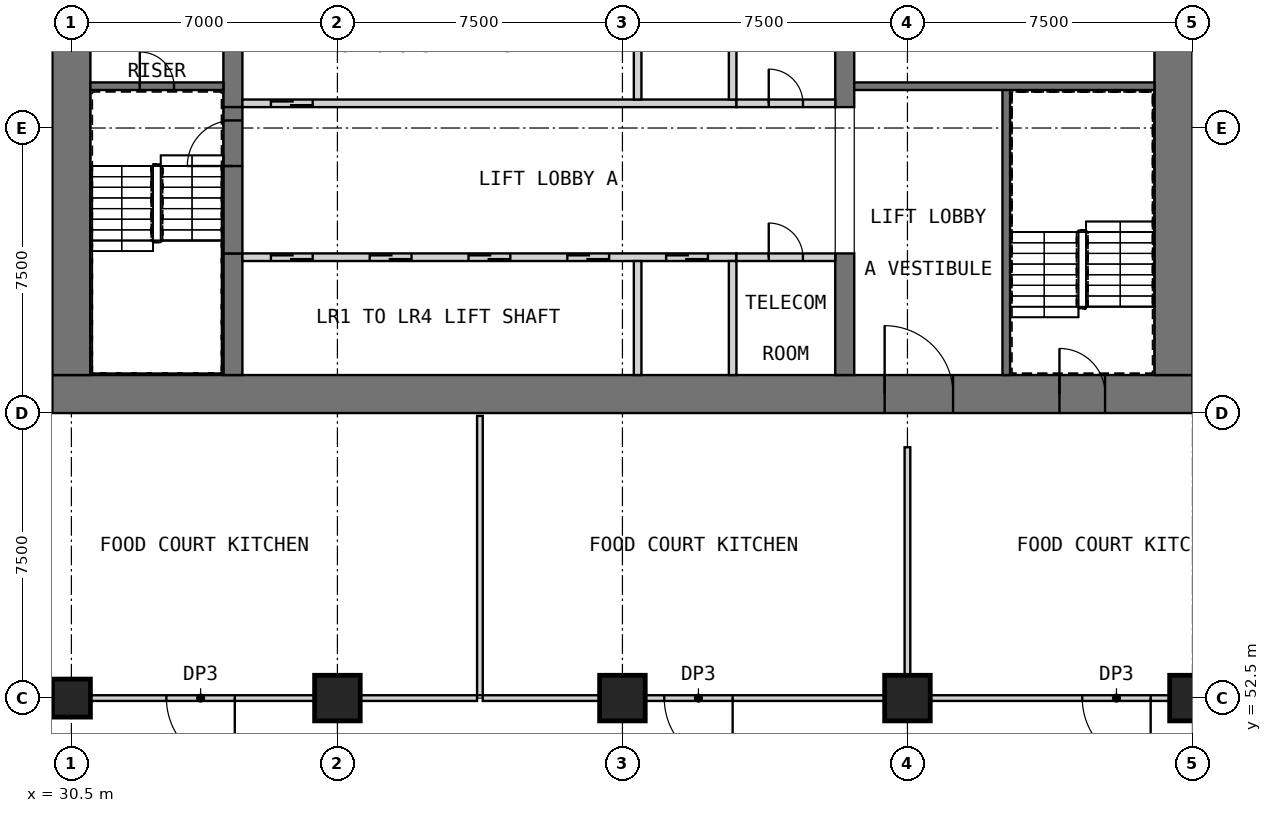
"""IFC4 building model, lengths in metres.
Left out: names, types, materials, properties, quantities, classifications, styles, units other than length and angle.
Written with IfcOpenShell. Run it as: python <this file> out.ifc"""

import sys

from ifc_helpers import new_model, si_unit, direction, frame, frame_2d, origin, origin_2d, place, context, subcontext, project, spatial, rectangle, extrude, element, fill, save


model = new_model("IFC4")
c1 = context("Model", 3, precision=1e-05, world=origin(), true_north=direction((0.0, 1.0)))
c2 = subcontext(c1, "Body", "Model", "MODEL_VIEW")
j1 = project(units=[si_unit("LENGTHUNIT", "METRE"), si_unit("PLANEANGLEUNIT", "RADIAN")], contexts=[c1])
p1 = place(None, origin())
s1 = spatial("IfcSite", under=j1, at=p1, CompositionType="ELEMENT")
p2 = place(p1, origin())
s2 = spatial("IfcBuilding", under=s1, at=p2, CompositionType="ELEMENT")
p3 = place(p2, frame((0.0, 0.0, 18.5)))
s3 = spatial("IfcBuildingStorey", under=s2, at=p3, CompositionType="ELEMENT", Elevation=18.5)
p4 = place(p3, frame((30.5, 52.5, 0.0), z_axis=(0.0, 0.0, 1.0), x_axis=(1.0, 0.0, 0.0)))
e1 = element("IfcColumn", 1, at=p4, inside=s3, PredefinedType="COLUMN", context=c2, shape_type="SweptSolid", body=[
    extrude(rectangle(XDim=1.0, YDim=1.0, at=origin_2d()), origin(), (0.0, 0.0, 1.0), 5.0),
])
for number, where, z_axis, x_axis in (
    (2, (37.5, 52.5, 0.0), (0.0, 0.0, 1.0), (1.0, 0.0, 0.0)),
    (3, (45.0, 52.5, 0.0), (0.0, 0.0, 1.0), (1.0, 0.0, 0.0)),
    (4, (52.5, 52.5, 0.0), (0.0, 0.0, 1.0), (1.0, 0.0, 0.0)),
    (5, (60.0, 52.5, 0.0), (0.0, 0.0, 1.0), (1.0, 0.0, 0.0)),
):
    element("IfcColumn", number, at=place(p3, frame(where, z_axis=z_axis, x_axis=x_axis)), inside=s3, PredefinedType="COLUMN", context=c2, shape_type="SweptSolid", body=[
        extrude(rectangle(XDim=1.2, YDim=1.2, at=origin_2d()), origin(), (0.0, 0.0, 1.0), 5.0),
    ])
p5 = place(p3, frame((30.0, 60.5, 0.0), z_axis=(0.0, 0.0, 1.0), x_axis=(1.0, 0.0, 0.0)))
e6 = element("IfcWall", 6, at=p5, inside=s3, PredefinedType="SHEAR", context=c2, shape_type="SweptSolid", body=[
    extrude(rectangle(XDim=30.0, YDim=1.0, at=frame_2d((15.0, 0.0))), origin(), (0.0, 0.0, 1.0), 5.0),
])
p6 = place(p5, frame((21.9, 0.0, 0.0)))
e7 = element("IfcOpeningElement", 7, at=p6, cuts=e6, PredefinedType="OPENING", context=c2, shape_type="SweptSolid", body=[
    extrude(rectangle(XDim=1.8, YDim=2.1, at=frame_2d((0.9, 1.05))), frame((0.0, 0.51, 0.0), z_axis=(0.0, -1.0, 0.0), x_axis=(1.0, 0.0, 0.0)), (0.0, 0.0, 1.0), 1.02),
])
p7 = place(p5, frame((26.5, 0.0, 0.0)))
e8 = element("IfcOpeningElement", 8, at=p7, cuts=e6, PredefinedType="OPENING", context=c2, shape_type="SweptSolid", body=[
    extrude(rectangle(XDim=1.2, YDim=2.1, at=frame_2d((0.6, 1.05))), frame((0.0, 0.51, 0.0), z_axis=(0.0, -1.0, 0.0), x_axis=(1.0, 0.0, 0.0)), (0.0, 0.0, 1.0), 1.02),
])
p8 = place(p3, frame((30.5, 61.0, 0.0), z_axis=(0.0, 0.0, 1.0), x_axis=(0.0, 1.0, 0.0)))
e9 = element("IfcWall", 9, at=p8, inside=s3, PredefinedType="SHEAR", context=c2, shape_type="SweptSolid", body=[
    extrude(rectangle(XDim=20.5, YDim=1.0, at=frame_2d((10.25, 0.0))), origin(), (0.0, 0.0, 1.0), 5.0),
])
p9 = place(p3, frame((59.5, 61.0, 0.0), z_axis=(0.0, 0.0, 1.0), x_axis=(0.0, 1.0, 0.0)))
e10 = element("IfcWall", 10, at=p9, inside=s3, PredefinedType="SHEAR", context=c2, shape_type="SweptSolid", body=[
    extrude(rectangle(XDim=20.5, YDim=1.0, at=frame_2d((10.25, 0.0))), origin(), (0.0, 0.0, 1.0), 5.0),
])
p10 = place(p9, frame((14.5, 0.0, 0.0)))
e11 = element("IfcOpeningElement", 11, at=p10, cuts=e10, PredefinedType="OPENING", context=c2, shape_type="SweptSolid", body=[
    extrude(rectangle(XDim=1.8, YDim=2.1, at=frame_2d((0.9, 1.05))), frame((0.0, 0.51, 0.0), z_axis=(0.0, -1.0, 0.0), x_axis=(1.0, 0.0, 0.0)), (0.0, 0.0, 1.0), 1.02),
])
p11 = place(p3, frame((34.75, 61.0, 0.0), z_axis=(0.0, 0.0, 1.0), x_axis=(0.0, 1.0, 0.0)))
e12 = element("IfcWall", 12, at=p11, inside=s3, PredefinedType="SHEAR", context=c2, shape_type="SweptSolid", body=[
    extrude(rectangle(XDim=3.2, YDim=0.5, at=frame_2d((1.6, 0.0))), origin(), (0.0, 0.0, 1.0), 5.0),
])
p12 = place(p3, frame((34.75, 68.05, 0.0), z_axis=(0.0, 0.0, 1.0), x_axis=(0.0, 1.0, 0.0)))
e13 = element("IfcWall", 13, at=p12, inside=s3, PredefinedType="SHEAR", context=c2, shape_type="SweptSolid", body=[
    extrude(rectangle(XDim=6.4, YDim=0.5, at=frame_2d((3.2, 0.0))), origin(), (0.0, 0.0, 1.0), 5.0),
])
p13 = place(p3, frame((50.85, 61.0, 0.0), z_axis=(0.0, 0.0, 1.0), x_axis=(0.0, 1.0, 0.0)))
e14 = element("IfcWall", 14, at=p13, inside=s3, PredefinedType="SHEAR", context=c2, shape_type="SweptSolid", body=[
    extrude(rectangle(XDim=3.2, YDim=0.5, at=frame_2d((1.6, 0.0))), origin(), (0.0, 0.0, 1.0), 5.0),
])
p14 = place(p3, frame((50.85, 68.05, 0.0), z_axis=(0.0, 0.0, 1.0), x_axis=(0.0, 1.0, 0.0)))
e15 = element("IfcWall", 15, at=p14, inside=s3, PredefinedType="SHEAR", context=c2, shape_type="SweptSolid", body=[
    extrude(rectangle(XDim=6.4, YDim=0.5, at=frame_2d((3.2, 0.0))), origin(), (0.0, 0.0, 1.0), 5.0),
])
p15 = place(p3, frame((35.0, 64.1, 0.0), z_axis=(0.0, 0.0, 1.0), x_axis=(1.0, 0.0, 0.0)))
e16 = element("IfcWall", 16, at=p15, inside=s3, PredefinedType="SOLIDWALL", context=c2, shape_type="SweptSolid", body=[
    extrude(rectangle(XDim=13.0, YDim=0.2, at=frame_2d((6.5, 0.0))), origin(), (0.0, 0.0, 1.0), 5.0),
])
p16 = place(p15, frame((0.75, 0.0, 0.0)))
e17 = element("IfcOpeningElement", 17, at=p16, cuts=e16, PredefinedType="OPENING", context=c2, shape_type="SweptSolid", body=[
    extrude(rectangle(XDim=1.1, YDim=2.1, at=frame_2d((0.55, 1.05))), frame((0.0, 0.11, 0.0), z_axis=(0.0, -1.0, 0.0), x_axis=(1.0, 0.0, 0.0)), (0.0, 0.0, 1.0), 0.22),
])
p17 = place(p15, frame((3.35, 0.0, 0.0)))
e18 = element("IfcOpeningElement", 18, at=p17, cuts=e16, PredefinedType="OPENING", context=c2, shape_type="SweptSolid", body=[
    extrude(rectangle(XDim=1.1, YDim=2.1, at=frame_2d((0.55, 1.05))), frame((0.0, 0.11, 0.0), z_axis=(0.0, -1.0, 0.0), x_axis=(1.0, 0.0, 0.0)), (0.0, 0.0, 1.0), 0.22),
])
p18 = place(p15, frame((5.95, 0.0, 0.0)))
e19 = element("IfcOpeningElement", 19, at=p18, cuts=e16, PredefinedType="OPENING", context=c2, shape_type="SweptSolid", body=[
    extrude(rectangle(XDim=1.1, YDim=2.1, at=frame_2d((0.55, 1.05))), frame((0.0, 0.11, 0.0), z_axis=(0.0, -1.0, 0.0), x_axis=(1.0, 0.0, 0.0)), (0.0, 0.0, 1.0), 0.22),
])
p19 = place(p15, frame((8.55, 0.0, 0.0)))
e20 = element("IfcOpeningElement", 20, at=p19, cuts=e16, PredefinedType="OPENING", context=c2, shape_type="SweptSolid", body=[
    extrude(rectangle(XDim=1.1, YDim=2.1, at=frame_2d((0.55, 1.05))), frame((0.0, 0.11, 0.0), z_axis=(0.0, -1.0, 0.0), x_axis=(1.0, 0.0, 0.0)), (0.0, 0.0, 1.0), 0.22),
])
p20 = place(p15, frame((11.15, 0.0, 0.0)))
e21 = element("IfcOpeningElement", 21, at=p20, cuts=e16, PredefinedType="OPENING", context=c2, shape_type="SweptSolid", body=[
    extrude(rectangle(XDim=1.1, YDim=2.1, at=frame_2d((0.55, 1.05))), frame((0.0, 0.11, 0.0), z_axis=(0.0, -1.0, 0.0), x_axis=(1.0, 0.0, 0.0)), (0.0, 0.0, 1.0), 0.22),
])
for number, where, z_axis, x_axis in (
    (22, (45.4, 61.0, 0.0), (0.0, 0.0, 1.0), (0.0, 1.0, 0.0)),
    (23, (47.9, 61.0, 0.0), (0.0, 0.0, 1.0), (0.0, 1.0, 0.0)),
):
    element("IfcWall", number, at=place(p3, frame(where, z_axis=z_axis, x_axis=x_axis)), inside=s3, PredefinedType="SOLIDWALL", context=c2, shape_type="SweptSolid", body=[
        extrude(rectangle(XDim=3.0, YDim=0.2, at=frame_2d((1.5, 0.0))), origin(), (0.0, 0.0, 1.0), 5.0),
    ])
p21 = place(p3, frame((48.0, 64.1, 0.0), z_axis=(0.0, 0.0, 1.0), x_axis=(1.0, 0.0, 0.0)))
e24 = element("IfcWall", 24, at=p21, inside=s3, PredefinedType="PARTITIONING", context=c2, shape_type="SweptSolid", body=[
    extrude(rectangle(XDim=2.6, YDim=0.2, at=frame_2d((1.3, 0.0))), origin(), (0.0, 0.0, 1.0), 4.7),
])
p22 = place(p21, frame((0.85, 0.0, 0.0)))
e25 = element("IfcOpeningElement", 25, at=p22, cuts=e24, PredefinedType="OPENING", context=c2, shape_type="SweptSolid", body=[
    extrude(rectangle(XDim=0.9, YDim=2.1, at=frame_2d((0.45, 1.05))), frame((0.0, 0.11, 0.0), z_axis=(0.0, -1.0, 0.0), x_axis=(1.0, 0.0, 0.0)), (0.0, 0.0, 1.0), 0.22),
])
p23 = place(p3, frame((35.0, 68.15, 0.0), z_axis=(0.0, 0.0, 1.0), x_axis=(1.0, 0.0, 0.0)))
e26 = element("IfcWall", 26, at=p23, inside=s3, PredefinedType="SOLIDWALL", context=c2, shape_type="SweptSolid", body=[
    extrude(rectangle(XDim=13.0, YDim=0.2, at=frame_2d((6.5, 0.0))), origin(), (0.0, 0.0, 1.0), 5.0),
])
p24 = place(p23, frame((0.75, 0.0, 0.0)))
e27 = element("IfcOpeningElement", 27, at=p24, cuts=e26, PredefinedType="OPENING", context=c2, shape_type="SweptSolid", body=[
    extrude(rectangle(XDim=1.1, YDim=2.1, at=frame_2d((0.55, 1.05))), frame((0.0, 0.11, 0.0), z_axis=(0.0, -1.0, 0.0), x_axis=(1.0, 0.0, 0.0)), (0.0, 0.0, 1.0), 0.22),
])
for number, where, z_axis, x_axis in (
    (28, (45.4, 68.25, 0.0), (0.0, 0.0, 1.0), (0.0, 1.0, 0.0)),
    (29, (47.9, 68.25, 0.0), (0.0, 0.0, 1.0), (0.0, 1.0, 0.0)),
):
    element("IfcWall", number, at=place(p3, frame(where, z_axis=z_axis, x_axis=x_axis)), inside=s3, PredefinedType="SOLIDWALL", context=c2, shape_type="SweptSolid", body=[
        extrude(rectangle(XDim=2.75, YDim=0.2, at=frame_2d((1.375, 0.0))), origin(), (0.0, 0.0, 1.0), 5.0),
    ])
p25 = place(p3, frame((48.0, 68.15, 0.0), z_axis=(0.0, 0.0, 1.0), x_axis=(1.0, 0.0, 0.0)))
e30 = element("IfcWall", 30, at=p25, inside=s3, PredefinedType="PARTITIONING", context=c2, shape_type="SweptSolid", body=[
    extrude(rectangle(XDim=2.6, YDim=0.2, at=frame_2d((1.3, 0.0))), origin(), (0.0, 0.0, 1.0), 4.7),
])
p26 = place(p25, frame((0.85, 0.0, 0.0)))
e31 = element("IfcOpeningElement", 31, at=p26, cuts=e30, PredefinedType="OPENING", context=c2, shape_type="SweptSolid", body=[
    extrude(rectangle(XDim=0.9, YDim=2.1, at=frame_2d((0.45, 1.05))), frame((0.0, 0.11, 0.0), z_axis=(0.0, -1.0, 0.0), x_axis=(1.0, 0.0, 0.0)), (0.0, 0.0, 1.0), 0.22),
])
p27 = place(p3, frame((34.75, 64.2, 0.0), z_axis=(0.0, 0.0, 1.0), x_axis=(0.0, 1.0, 0.0)))
e32 = element("IfcWall", 32, at=p27, inside=s3, PredefinedType="SOLIDWALL", context=c2, shape_type="SweptSolid", body=[
    extrude(rectangle(XDim=3.85, YDim=0.5, at=frame_2d((1.925, 0.0))), origin(), (0.0, 0.0, 1.0), 3.8),
])
p28 = place(p27, frame((2.3, 0.0, 0.0)))
e33 = element("IfcOpeningElement", 33, at=p28, cuts=e32, PredefinedType="OPENING", context=c2, shape_type="SweptSolid", body=[
    extrude(rectangle(XDim=1.2, YDim=2.1, at=frame_2d((0.6, 1.05))), frame((0.0, 0.26, 0.0), z_axis=(0.0, -1.0, 0.0), x_axis=(1.0, 0.0, 0.0)), (0.0, 0.0, 1.0), 0.52),
])
p29 = place(p3, frame((31.0, 68.6, 0.0), z_axis=(0.0, 0.0, 1.0), x_axis=(1.0, 0.0, 0.0)))
e34 = element("IfcWall", 34, at=p29, inside=s3, PredefinedType="SOLIDWALL", context=c2, shape_type="SweptSolid", body=[
    extrude(rectangle(XDim=3.5, YDim=0.2, at=frame_2d((1.75, 0.0))), origin(), (0.0, 0.0, 1.0), 4.7),
])
p30 = place(p29, frame((1.3, 0.0, 0.0)))
e35 = element("IfcOpeningElement", 35, at=p30, cuts=e34, PredefinedType="OPENING", context=c2, shape_type="SweptSolid", body=[
    extrude(rectangle(XDim=0.9, YDim=2.1, at=frame_2d((0.45, 1.05))), frame((0.0, 0.11, 0.0), z_axis=(0.0, -1.0, 0.0), x_axis=(1.0, 0.0, 0.0)), (0.0, 0.0, 1.0), 0.22),
])
p31 = place(p3, frame((55.1, 61.0, 0.0), z_axis=(0.0, 0.0, 1.0), x_axis=(0.0, 1.0, 0.0)))
e36 = element("IfcWall", 36, at=p31, inside=s3, PredefinedType="SOLIDWALL", context=c2, shape_type="SweptSolid", body=[
    extrude(rectangle(XDim=7.6, YDim=0.2, at=frame_2d((3.8, 0.0))), origin(), (0.0, 0.0, 1.0), 4.7),
])
p32 = place(p3, frame((51.1, 68.6, 0.0), z_axis=(0.0, 0.0, 1.0), x_axis=(1.0, 0.0, 0.0)))
e37 = element("IfcWall", 37, at=p32, inside=s3, PredefinedType="SOLIDWALL", context=c2, shape_type="SweptSolid", body=[
    extrude(rectangle(XDim=7.9, YDim=0.2, at=frame_2d((3.95, 0.0))), origin(), (0.0, 0.0, 1.0), 4.7),
])
p33 = place(p3, frame((36.9, 52.5, 0.0), z_axis=(0.0, 0.0, 1.0), x_axis=(-1.0, 0.0, 0.0)))
e38 = element("IfcWall", 38, at=p33, inside=s3, PredefinedType="PARTITIONING", context=c2, shape_type="SweptSolid", body=[
    extrude(rectangle(XDim=5.9, YDim=0.15, at=frame_2d((2.95, 0.0))), origin(), (0.0, 0.0, 1.0), 4.7),
])
p34 = place(p33, frame((2.1, 0.0, 0.0)))
e39 = element("IfcOpeningElement", 39, at=p34, cuts=e38, PredefinedType="OPENING", context=c2, shape_type="SweptSolid", body=[
    extrude(rectangle(XDim=1.8, YDim=2.4, at=frame_2d((0.9, 1.2))), frame((0.0, 0.085, 0.0), z_axis=(0.0, -1.0, 0.0), x_axis=(1.0, 0.0, 0.0)), (0.0, 0.0, 1.0), 0.17),
])
for number, where, z_axis, x_axis in (
    (40, (38.1, 52.5, 0.0), (0.0, 0.0, 1.0), (1.0, 0.0, 0.0)),
    (41, (41.325, 52.5, 0.0), (0.0, 0.0, 1.0), (1.0, 0.0, 0.0)),
):
    element("IfcWall", number, at=place(p3, frame(where, z_axis=z_axis, x_axis=x_axis)), inside=s3, PredefinedType="PARTITIONING", context=c2, shape_type="SweptSolid", body=[
        extrude(rectangle(XDim=3.075, YDim=0.15, at=frame_2d((1.538, 0.0))), origin(), (0.0, 0.0, 1.0), 4.7),
    ])
p35 = place(p3, frame((51.9, 52.5, 0.0), z_axis=(0.0, 0.0, 1.0), x_axis=(-1.0, 0.0, 0.0)))
e42 = element("IfcWall", 42, at=p35, inside=s3, PredefinedType="PARTITIONING", context=c2, shape_type="SweptSolid", body=[
    extrude(rectangle(XDim=6.3, YDim=0.15, at=frame_2d((3.15, 0.0))), origin(), (0.0, 0.0, 1.0), 4.7),
])
p36 = place(p35, frame((4.0, 0.0, 0.0)))
e43 = element("IfcOpeningElement", 43, at=p36, cuts=e42, PredefinedType="OPENING", context=c2, shape_type="SweptSolid", body=[
    extrude(rectangle(XDim=1.8, YDim=2.4, at=frame_2d((0.9, 1.2))), frame((0.0, 0.085, 0.0), z_axis=(0.0, -1.0, 0.0), x_axis=(1.0, 0.0, 0.0)), (0.0, 0.0, 1.0), 0.17),
])
p37 = place(p3, frame((59.4, 52.5, 0.0), z_axis=(0.0, 0.0, 1.0), x_axis=(-1.0, 0.0, 0.0)))
e44 = element("IfcWall", 44, at=p37, inside=s3, PredefinedType="PARTITIONING", context=c2, shape_type="SweptSolid", body=[
    extrude(rectangle(XDim=6.3, YDim=0.15, at=frame_2d((3.15, 0.0))), origin(), (0.0, 0.0, 1.0), 4.7),
])
p38 = place(p37, frame((0.5, 0.0, 0.0)))
e45 = element("IfcOpeningElement", 45, at=p38, cuts=e44, PredefinedType="OPENING", context=c2, shape_type="SweptSolid", body=[
    extrude(rectangle(XDim=1.8, YDim=2.4, at=frame_2d((0.9, 1.2))), frame((0.0, 0.085, 0.0), z_axis=(0.0, -1.0, 0.0), x_axis=(1.0, 0.0, 0.0)), (0.0, 0.0, 1.0), 0.17),
])
p39 = place(p3, frame((41.25, 52.575, 0.0), z_axis=(0.0, 0.0, 1.0), x_axis=(0.0, 1.0, 0.0)))
e46 = element("IfcWall", 46, at=p39, inside=s3, PredefinedType="PARTITIONING", context=c2, shape_type="SweptSolid", body=[
    extrude(rectangle(XDim=7.35, YDim=0.15, at=frame_2d((3.675, 0.0))), origin(), (0.0, 0.0, 1.0), 4.7),
])
p40 = place(p3, frame((52.5, 53.1, 0.0), z_axis=(0.0, 0.0, 1.0), x_axis=(0.0, 1.0, 0.0)))
e47 = element("IfcWall", 47, at=p40, inside=s3, PredefinedType="PARTITIONING", context=c2, shape_type="SweptSolid", body=[
    extrude(rectangle(XDim=6.0, YDim=0.15, at=frame_2d((3.0, 0.0))), origin(), (0.0, 0.0, 1.0), 4.7),
])
p41 = place(p16, origin())
e48 = element("IfcDoor", 48, at=p41, inside=s3, OperationType="DOUBLE_DOOR_SLIDING", PredefinedType="DOOR", context=c2, shape_type="SweptSolid", body=[
    extrude(rectangle(XDim=1.1, YDim=2.1, at=frame_2d((0.55, 1.05))), frame((0.0, 0.025, 0.0), z_axis=(0.0, -1.0, 0.0), x_axis=(1.0, 0.0, 0.0)), (0.0, 0.0, 1.0), 0.05),
])
fill(e17, e48)
p42 = place(p17, origin())
e49 = element("IfcDoor", 49, at=p42, inside=s3, OperationType="DOUBLE_DOOR_SLIDING", PredefinedType="DOOR", context=c2, shape_type="SweptSolid", body=[
    extrude(rectangle(XDim=1.1, YDim=2.1, at=frame_2d((0.55, 1.05))), frame((0.0, 0.025, 0.0), z_axis=(0.0, -1.0, 0.0), x_axis=(1.0, 0.0, 0.0)), (0.0, 0.0, 1.0), 0.05),
])
fill(e18, e49)
p43 = place(p18, origin())
e50 = element("IfcDoor", 50, at=p43, inside=s3, OperationType="DOUBLE_DOOR_SLIDING", PredefinedType="DOOR", context=c2, shape_type="SweptSolid", body=[
    extrude(rectangle(XDim=1.1, YDim=2.1, at=frame_2d((0.55, 1.05))), frame((0.0, 0.025, 0.0), z_axis=(0.0, -1.0, 0.0), x_axis=(1.0, 0.0, 0.0)), (0.0, 0.0, 1.0), 0.05),
])
fill(e19, e50)
p44 = place(p19, origin())
e51 = element("IfcDoor", 51, at=p44, inside=s3, OperationType="DOUBLE_DOOR_SLIDING", PredefinedType="DOOR", context=c2, shape_type="SweptSolid", body=[
    extrude(rectangle(XDim=1.1, YDim=2.1, at=frame_2d((0.55, 1.05))), frame((0.0, 0.025, 0.0), z_axis=(0.0, -1.0, 0.0), x_axis=(1.0, 0.0, 0.0)), (0.0, 0.0, 1.0), 0.05),
])
fill(e20, e51)
p45 = place(p20, origin())
e52 = element("IfcDoor", 52, at=p45, inside=s3, OperationType="DOUBLE_DOOR_SLIDING", PredefinedType="DOOR", context=c2, shape_type="SweptSolid", body=[
    extrude(rectangle(XDim=1.1, YDim=2.1, at=frame_2d((0.55, 1.05))), frame((0.0, 0.025, 0.0), z_axis=(0.0, -1.0, 0.0), x_axis=(1.0, 0.0, 0.0)), (0.0, 0.0, 1.0), 0.05),
])
fill(e21, e52)
p46 = place(p22, origin())
e53 = element("IfcDoor", 53, at=p46, inside=s3, OperationType="SINGLE_SWING_LEFT", PredefinedType="DOOR", context=c2, shape_type="SweptSolid", body=[
    extrude(rectangle(XDim=0.9, YDim=2.1, at=frame_2d((0.45, 1.05))), frame((0.0, 0.025, 0.0), z_axis=(0.0, -1.0, 0.0), x_axis=(1.0, 0.0, 0.0)), (0.0, 0.0, 1.0), 0.05),
])
fill(e25, e53)
p47 = place(p24, origin())
e54 = element("IfcDoor", 54, at=p47, inside=s3, OperationType="DOUBLE_DOOR_SLIDING", PredefinedType="DOOR", context=c2, shape_type="SweptSolid", body=[
    extrude(rectangle(XDim=1.1, YDim=2.1, at=frame_2d((0.55, 1.05))), frame((0.0, 0.025, 0.0), z_axis=(0.0, -1.0, 0.0), x_axis=(1.0, 0.0, 0.0)), (0.0, 0.0, 1.0), 0.05),
])
fill(e27, e54)
p48 = place(p26, origin())
e55 = element("IfcDoor", 55, at=p48, inside=s3, OperationType="SINGLE_SWING_LEFT", PredefinedType="DOOR", context=c2, shape_type="SweptSolid", body=[
    extrude(rectangle(XDim=0.9, YDim=2.1, at=frame_2d((0.45, 1.05))), frame((0.0, 0.025, 0.0), z_axis=(0.0, -1.0, 0.0), x_axis=(1.0, 0.0, 0.0)), (0.0, 0.0, 1.0), 0.05),
])
fill(e31, e55)
p49 = place(p6, origin())
e56 = element("IfcDoor", 56, at=p49, inside=s3, OperationType="DOUBLE_DOOR_SINGLE_SWING", PredefinedType="DOOR", context=c2, shape_type="SweptSolid", body=[
    extrude(rectangle(XDim=1.8, YDim=2.1, at=frame_2d((0.9, 1.05))), frame((0.0, 0.025, 0.0), z_axis=(0.0, -1.0, 0.0), x_axis=(1.0, 0.0, 0.0)), (0.0, 0.0, 1.0), 0.05),
])
fill(e7, e56)
p50 = place(p28, origin())
e57 = element("IfcDoor", 57, at=p50, inside=s3, OperationType="SINGLE_SWING_LEFT", PredefinedType="DOOR", context=c2, shape_type="SweptSolid", body=[
    extrude(rectangle(XDim=1.2, YDim=2.1, at=frame_2d((0.6, 1.05))), frame((0.0, 0.025, 0.0), z_axis=(0.0, -1.0, 0.0), x_axis=(1.0, 0.0, 0.0)), (0.0, 0.0, 1.0), 0.05),
])
fill(e33, e57)
p51 = place(p30, origin())
e58 = element("IfcDoor", 58, at=p51, inside=s3, OperationType="SINGLE_SWING_LEFT", PredefinedType="DOOR", context=c2, shape_type="SweptSolid", body=[
    extrude(rectangle(XDim=0.9, YDim=2.1, at=frame_2d((0.45, 1.05))), frame((0.0, 0.025, 0.0), z_axis=(0.0, -1.0, 0.0), x_axis=(1.0, 0.0, 0.0)), (0.0, 0.0, 1.0), 0.05),
])
fill(e35, e58)
p52 = place(p7, origin())
e59 = element("IfcDoor", 59, at=p52, inside=s3, OperationType="SINGLE_SWING_LEFT", PredefinedType="DOOR", context=c2, shape_type="SweptSolid", body=[
    extrude(rectangle(XDim=1.2, YDim=2.1, at=frame_2d((0.6, 1.05))), frame((0.0, 0.025, 0.0), z_axis=(0.0, -1.0, 0.0), x_axis=(1.0, 0.0, 0.0)), (0.0, 0.0, 1.0), 0.05),
])
fill(e8, e59)
p53 = place(p34, origin())
e60 = element("IfcDoor", 60, at=p53, inside=s3, OperationType="SINGLE_SWING_LEFT", PredefinedType="DOOR", context=c2, shape_type="SweptSolid", body=[
    extrude(rectangle(XDim=1.8, YDim=2.4, at=frame_2d((0.9, 1.2))), frame((0.0, 0.025, 0.0), z_axis=(0.0, -1.0, 0.0), x_axis=(1.0, 0.0, 0.0)), (0.0, 0.0, 1.0), 0.05),
])
fill(e39, e60)
p54 = place(p36, origin())
e61 = element("IfcDoor", 61, at=p54, inside=s3, OperationType="SINGLE_SWING_LEFT", PredefinedType="DOOR", context=c2, shape_type="SweptSolid", body=[
    extrude(rectangle(XDim=1.8, YDim=2.4, at=frame_2d((0.9, 1.2))), frame((0.0, 0.025, 0.0), z_axis=(0.0, -1.0, 0.0), x_axis=(1.0, 0.0, 0.0)), (0.0, 0.0, 1.0), 0.05),
])
fill(e43, e61)
p55 = place(p38, origin())
e62 = element("IfcDoor", 62, at=p55, inside=s3, OperationType="SINGLE_SWING_LEFT", PredefinedType="DOOR", context=c2, shape_type="SweptSolid", body=[
    extrude(rectangle(XDim=1.8, YDim=2.4, at=frame_2d((0.9, 1.2))), frame((0.0, 0.025, 0.0), z_axis=(0.0, -1.0, 0.0), x_axis=(1.0, 0.0, 0.0)), (0.0, 0.0, 1.0), 0.05),
])
fill(e45, e62)
save(model, sys.argv[1])
